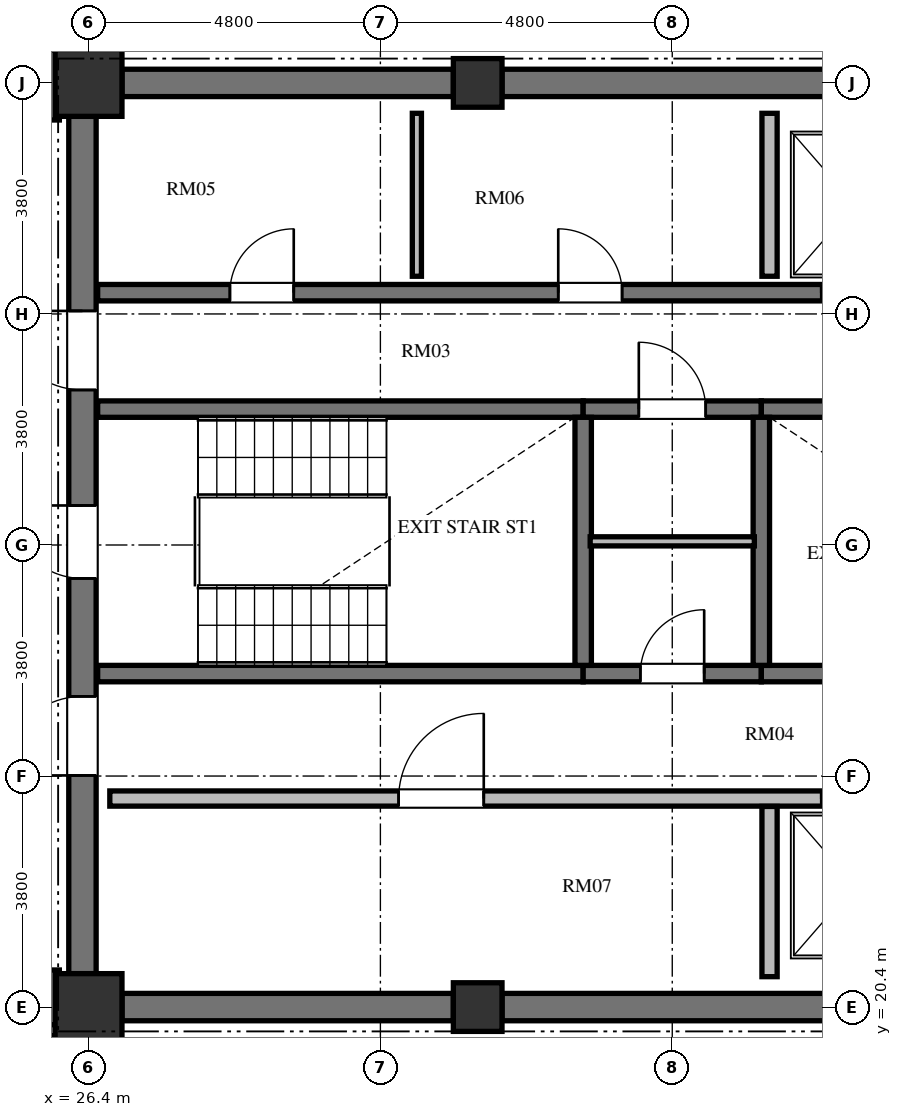
"""IFC4 building model, lengths in metres.
Left out: names, types, materials, properties, quantities, classifications, styles, units other than length and angle.
Written with IfcOpenShell. Run it as: python <this file> out.ifc"""

import sys

from ifc_helpers import new_model, si_unit, direction, frame, frame_2d, origin, origin_2d, place, context, subcontext, project, spatial, rectangle, extrude, element, fill, save


model = new_model("IFC4")
c1 = context("Model", 3, precision=1e-05, world=origin(), true_north=direction((0.0, 1.0)))
c2 = subcontext(c1, "Body", "Model", "MODEL_VIEW")
j1 = project(units=[si_unit("LENGTHUNIT", "METRE"), si_unit("PLANEANGLEUNIT", "RADIAN")], contexts=[c1])
p1 = place(None, origin())
s1 = spatial("IfcSite", under=j1, at=p1, CompositionType="ELEMENT")
p2 = place(p1, origin())
s2 = spatial("IfcBuilding", under=s1, at=p2, CompositionType="ELEMENT")
p3 = place(p2, frame((0.0, 0.0, 255.024)))
s3 = spatial("IfcBuildingStorey", under=s2, at=p3, CompositionType="ELEMENT", Elevation=255.024)
p4 = place(p3, frame((26.4, 20.4, 0.0), z_axis=(0.0, 0.0, 1.0), x_axis=(1.0, 0.0, 0.0)))
e1 = element("IfcColumn", 1, at=p4, inside=s3, PredefinedType="COLUMN", context=c2, shape_type="SweptSolid", body=[
    extrude(rectangle(XDim=1.1, YDim=1.1, at=origin_2d()), origin(), (0.0, 0.0, 1.0), 3.648),
])
for number, where, z_axis, x_axis in (
    (2, (32.8, 20.4, 0.0), (0.0, 0.0, 1.0), (1.0, 0.0, 0.0)),
    (3, (32.8, 35.6, 0.0), (0.0, 0.0, 1.0), (1.0, 0.0, 0.0)),
):
    element("IfcColumn", number, at=place(p3, frame(where, z_axis=z_axis, x_axis=x_axis)), inside=s3, PredefinedType="COLUMN", context=c2, shape_type="SweptSolid", body=[
        extrude(rectangle(XDim=0.8, YDim=0.8, at=origin_2d()), origin(), (0.0, 0.0, 1.0), 3.648),
    ])
p5 = place(p3, frame((26.4, 35.6, 0.0), z_axis=(0.0, 0.0, 1.0), x_axis=(1.0, 0.0, 0.0)))
e4 = element("IfcColumn", 4, at=p5, inside=s3, PredefinedType="COLUMN", context=c2, shape_type="SweptSolid", body=[
    extrude(rectangle(XDim=1.1, YDim=1.1, at=origin_2d()), origin(), (0.0, 0.0, 1.0), 3.648),
])
p6 = place(p3, frame((26.3, 20.95, 0.0), z_axis=(0.0, 0.0, 1.0), x_axis=(0.0, 1.0, 0.0)))
e5 = element("IfcWall", 5, at=p6, inside=s3, PredefinedType="SHEAR", context=c2, shape_type="SweptSolid", body=[
    extrude(rectangle(XDim=14.1, YDim=0.45, at=frame_2d((7.05, 0.0))), origin(), (0.0, 0.0, 1.0), 3.648),
])
p7 = place(p6, frame((6.5, 0.0, 0.0)))
e6 = element("IfcOpeningElement", 6, at=p7, cuts=e5, PredefinedType="OPENING", context=c2, shape_type="SweptSolid", body=[
    extrude(rectangle(XDim=1.2, YDim=2.15, at=frame_2d((0.6, 1.075))), frame((0.0, 0.235, 0.0), z_axis=(0.0, -1.0, 0.0), x_axis=(1.0, 0.0, 0.0)), (0.0, 0.0, 1.0), 0.47),
])
p8 = place(p6, frame((9.6, 0.0, 0.0)))
e7 = element("IfcOpeningElement", 7, at=p8, cuts=e5, PredefinedType="OPENING", context=c2, shape_type="SweptSolid", body=[
    extrude(rectangle(XDim=1.3, YDim=2.2, at=frame_2d((0.65, 1.1))), frame((0.0, 0.235, 0.0), z_axis=(0.0, -1.0, 0.0), x_axis=(1.0, 0.0, 0.0)), (0.0, 0.0, 1.0), 0.47),
])
p9 = place(p6, frame((3.26, 0.0, 0.0)))
e8 = element("IfcOpeningElement", 8, at=p9, cuts=e5, PredefinedType="OPENING", context=c2, shape_type="SweptSolid", body=[
    extrude(rectangle(XDim=1.3, YDim=2.2, at=frame_2d((0.65, 1.1))), frame((0.0, 0.235, 0.0), z_axis=(0.0, -1.0, 0.0), x_axis=(1.0, 0.0, 0.0)), (0.0, 0.0, 1.0), 0.47),
])
for number, where, z_axis, x_axis in (
    (9, (26.95, 20.4, 0.0), (0.0, 0.0, 1.0), (1.0, 0.0, 0.0)),
    (10, (26.95, 35.6, 0.0), (0.0, 0.0, 1.0), (1.0, 0.0, 0.0)),
):
    element("IfcWall", number, at=place(p3, frame(where, z_axis=z_axis, x_axis=x_axis)), inside=s3, PredefinedType="SHEAR", context=c2, shape_type="SweptSolid", body=[
        extrude(rectangle(XDim=5.45, YDim=0.45, at=frame_2d((2.725, 0.0))), origin(), (0.0, 0.0, 1.0), 3.648),
    ])
for number, where, z_axis, x_axis in (
    (11, (33.2, 20.4, 0.0), (0.0, 0.0, 1.0), (1.0, 0.0, 0.0)),
    (12, (33.2, 35.6, 0.0), (0.0, 0.0, 1.0), (1.0, 0.0, 0.0)),
):
    element("IfcWall", number, at=place(p3, frame(where, z_axis=z_axis, x_axis=x_axis)), inside=s3, PredefinedType="SHEAR", context=c2, shape_type="SweptSolid", body=[
        extrude(rectangle(XDim=5.6, YDim=0.45, at=frame_2d((2.8, 0.0))), origin(), (0.0, 0.0, 1.0), 3.648),
    ])
p10 = place(p3, frame((26.55, 30.235, 0.0), z_axis=(0.0, 0.0, 1.0), x_axis=(1.0, 0.0, 0.0)))
e13 = element("IfcWall", 13, at=p10, inside=s3, PredefinedType="SHEAR", context=c2, shape_type="SweptSolid", body=[
    extrude(rectangle(XDim=7.985, YDim=0.27, at=frame_2d((3.992, 0.0))), origin(), (0.0, 0.0, 1.0), 3.648),
])
p11 = place(p3, frame((34.535, 30.235, 0.0), z_axis=(0.0, 0.0, 1.0), x_axis=(1.0, 0.0, 0.0)))
e14 = element("IfcWall", 14, at=p11, inside=s3, PredefinedType="SHEAR", context=c2, shape_type="SweptSolid", body=[
    extrude(rectangle(XDim=2.93, YDim=0.27, at=frame_2d((1.465, 0.0))), origin(), (0.0, 0.0, 1.0), 3.648),
])
p12 = place(p11, frame((0.915, 0.0, 0.0)))
e15 = element("IfcOpeningElement", 15, at=p12, cuts=e14, PredefinedType="OPENING", context=c2, shape_type="SweptSolid", body=[
    extrude(rectangle(XDim=1.1, YDim=2.15, at=frame_2d((0.55, 1.075))), frame((0.0, 0.145, 0.0), z_axis=(0.0, -1.0, 0.0), x_axis=(1.0, 0.0, 0.0)), (0.0, 0.0, 1.0), 0.29),
])
p13 = place(p3, frame((37.465, 30.235, 0.0), z_axis=(0.0, 0.0, 1.0), x_axis=(1.0, 0.0, 0.0)))
e16 = element("IfcWall", 16, at=p13, inside=s3, PredefinedType="SHEAR", context=c2, shape_type="SweptSolid", body=[
    extrude(rectangle(XDim=7.985, YDim=0.27, at=frame_2d((3.992, 0.0))), origin(), (0.0, 0.0, 1.0), 3.648),
])
p14 = place(p13, frame((6.455, 0.0, 0.0)))
e17 = element("IfcOpeningElement", 17, at=p14, cuts=e16, PredefinedType="OPENING", context=c2, shape_type="SweptSolid", body=[
    extrude(rectangle(XDim=1.2, YDim=2.15, at=frame_2d((0.6, 1.075))), frame((0.0, 0.145, 0.0), z_axis=(0.0, -1.0, 0.0), x_axis=(1.0, 0.0, 0.0)), (0.0, 0.0, 1.0), 0.29),
])
p15 = place(p3, frame((26.55, 25.885, 0.0), z_axis=(0.0, 0.0, 1.0), x_axis=(1.0, 0.0, 0.0)))
e18 = element("IfcWall", 18, at=p15, inside=s3, PredefinedType="SHEAR", context=c2, shape_type="SweptSolid", body=[
    extrude(rectangle(XDim=7.985, YDim=0.27, at=frame_2d((3.992, 0.0))), origin(), (0.0, 0.0, 1.0), 3.648),
])
p16 = place(p3, frame((34.535, 25.885, 0.0), z_axis=(0.0, 0.0, 1.0), x_axis=(1.0, 0.0, 0.0)))
e19 = element("IfcWall", 19, at=p16, inside=s3, PredefinedType="SHEAR", context=c2, shape_type="SweptSolid", body=[
    extrude(rectangle(XDim=2.93, YDim=0.27, at=frame_2d((1.465, 0.0))), origin(), (0.0, 0.0, 1.0), 3.648),
])
p17 = place(p16, frame((0.94, 0.0, 0.0)))
e20 = element("IfcOpeningElement", 20, at=p17, cuts=e19, PredefinedType="OPENING", context=c2, shape_type="SweptSolid", body=[
    extrude(rectangle(XDim=1.05, YDim=2.15, at=frame_2d((0.525, 1.075))), frame((0.0, 0.145, 0.0), z_axis=(0.0, -1.0, 0.0), x_axis=(1.0, 0.0, 0.0)), (0.0, 0.0, 1.0), 0.29),
])
p18 = place(p3, frame((37.465, 25.885, 0.0), z_axis=(0.0, 0.0, 1.0), x_axis=(1.0, 0.0, 0.0)))
e21 = element("IfcWall", 21, at=p18, inside=s3, PredefinedType="SHEAR", context=c2, shape_type="SweptSolid", body=[
    extrude(rectangle(XDim=7.985, YDim=0.27, at=frame_2d((3.992, 0.0))), origin(), (0.0, 0.0, 1.0), 3.648),
])
for number, where, z_axis, x_axis in (
    (22, (34.535, 26.02, 0.0), (0.0, 0.0, 1.0), (0.0, 1.0, 0.0)),
    (23, (37.465, 26.02, 0.0), (0.0, 0.0, 1.0), (0.0, 1.0, 0.0)),
):
    element("IfcWall", number, at=place(p3, frame(where, z_axis=z_axis, x_axis=x_axis)), inside=s3, PredefinedType="SHEAR", context=c2, shape_type="SweptSolid", body=[
        extrude(rectangle(XDim=4.08, YDim=0.27, at=frame_2d((2.04, 0.0))), origin(), (0.0, 0.0, 1.0), 3.648),
    ])
p19 = place(p3, frame((34.65, 28.06, 0.0), z_axis=(0.0, 0.0, 1.0), x_axis=(1.0, 0.0, 0.0)))
e24 = element("IfcWall", 24, at=p19, inside=s3, PredefinedType="PARTITIONING", context=c2, shape_type="SweptSolid", body=[
    extrude(rectangle(XDim=2.7, YDim=0.15, at=frame_2d((1.35, 0.0))), origin(), (0.0, 0.0, 1.0), 3.448),
])
p20 = place(p3, frame((26.55, 32.15, 0.0), z_axis=(0.0, 0.0, 1.0), x_axis=(1.0, 0.0, 0.0)))
e25 = element("IfcWall", 25, at=p20, inside=s3, PredefinedType="SHEAR", context=c2, shape_type="SweptSolid", body=[
    extrude(rectangle(XDim=16.4, YDim=0.27, at=frame_2d((8.2, 0.0))), origin(), (0.0, 0.0, 1.0), 3.648),
])
p21 = place(p20, frame((2.175, 0.0, 0.0)))
e26 = element("IfcOpeningElement", 26, at=p21, cuts=e25, PredefinedType="OPENING", context=c2, shape_type="SweptSolid", body=[
    extrude(rectangle(XDim=1.05, YDim=2.15, at=frame_2d((0.525, 1.075))), frame((0.0, 0.145, 0.0), z_axis=(0.0, -1.0, 0.0), x_axis=(1.0, 0.0, 0.0)), (0.0, 0.0, 1.0), 0.29),
])
p22 = place(p20, frame((7.575, 0.0, 0.0)))
e27 = element("IfcOpeningElement", 27, at=p22, cuts=e25, PredefinedType="OPENING", context=c2, shape_type="SweptSolid", body=[
    extrude(rectangle(XDim=1.05, YDim=2.15, at=frame_2d((0.525, 1.075))), frame((0.0, 0.145, 0.0), z_axis=(0.0, -1.0, 0.0), x_axis=(1.0, 0.0, 0.0)), (0.0, 0.0, 1.0), 0.29),
])
p23 = place(p20, frame((11.9, 0.0, 0.0)))
e28 = element("IfcOpeningElement", 28, at=p23, cuts=e25, PredefinedType="OPENING", context=c2, shape_type="SweptSolid", body=[
    extrude(rectangle(XDim=1.1, YDim=2.2, at=frame_2d((0.55, 1.1))), frame((0.0, 0.145, 0.0), z_axis=(0.0, -1.0, 0.0), x_axis=(1.0, 0.0, 0.0)), (0.0, 0.0, 1.0), 0.29),
])
p24 = place(p20, frame((14.5, 0.0, 0.0)))
e29 = element("IfcOpeningElement", 29, at=p24, cuts=e25, PredefinedType="OPENING", context=c2, shape_type="SweptSolid", body=[
    extrude(rectangle(XDim=1.1, YDim=2.2, at=frame_2d((0.55, 1.1))), frame((0.0, 0.145, 0.0), z_axis=(0.0, -1.0, 0.0), x_axis=(1.0, 0.0, 0.0)), (0.0, 0.0, 1.0), 0.29),
])
p25 = place(p3, frame((26.75, 23.83, 0.0), z_axis=(0.0, 0.0, 1.0), x_axis=(1.0, 0.0, 0.0)))
e30 = element("IfcWall", 30, at=p25, inside=s3, PredefinedType="SOLIDWALL", context=c2, shape_type="SweptSolid", body=[
    extrude(rectangle(XDim=16.2, YDim=0.25, at=frame_2d((8.1, 0.0))), origin(), (0.0, 0.0, 1.0), 3.448),
])
p26 = place(p25, frame((4.75, 0.0, 0.0)))
e31 = element("IfcOpeningElement", 31, at=p26, cuts=e30, PredefinedType="OPENING", context=c2, shape_type="SweptSolid", body=[
    extrude(rectangle(XDim=1.4, YDim=2.2, at=frame_2d((0.7, 1.1))), frame((0.0, 0.135, 0.0), z_axis=(0.0, -1.0, 0.0), x_axis=(1.0, 0.0, 0.0)), (0.0, 0.0, 1.0), 0.27),
])
p27 = place(p25, frame((11.7, 0.0, 0.0)))
e32 = element("IfcOpeningElement", 32, at=p27, cuts=e30, PredefinedType="OPENING", context=c2, shape_type="SweptSolid", body=[
    extrude(rectangle(XDim=1.1, YDim=2.2, at=frame_2d((0.55, 1.1))), frame((0.0, 0.135, 0.0), z_axis=(0.0, -1.0, 0.0), x_axis=(1.0, 0.0, 0.0)), (0.0, 0.0, 1.0), 0.27),
])
p28 = place(p25, frame((14.15, 0.0, 0.0)))
e33 = element("IfcOpeningElement", 33, at=p28, cuts=e30, PredefinedType="OPENING", context=c2, shape_type="SweptSolid", body=[
    extrude(rectangle(XDim=1.4, YDim=2.3, at=frame_2d((0.7, 1.15))), frame((0.0, 0.135, 0.0), z_axis=(0.0, -1.0, 0.0), x_axis=(1.0, 0.0, 0.0)), (0.0, 0.0, 1.0), 0.27),
])
p29 = place(p3, frame((37.6, 32.42, 0.0), z_axis=(0.0, 0.0, 1.0), x_axis=(0.0, 1.0, 0.0)))
e34 = element("IfcWall", 34, at=p29, inside=s3, PredefinedType="SOLIDWALL", context=c2, shape_type="SweptSolid", body=[
    extrude(rectangle(XDim=2.68, YDim=0.25, at=frame_2d((1.34, 0.0))), origin(), (0.0, 0.0, 1.0), 3.448),
])
p30 = place(p3, frame((37.6, 20.9, 0.0), z_axis=(0.0, 0.0, 1.0), x_axis=(0.0, 1.0, 0.0)))
e35 = element("IfcWall", 35, at=p30, inside=s3, PredefinedType="SOLIDWALL", context=c2, shape_type="SweptSolid", body=[
    extrude(rectangle(XDim=2.8, YDim=0.25, at=frame_2d((1.4, 0.0))), origin(), (0.0, 0.0, 1.0), 3.448),
])
p31 = place(p3, frame((31.8, 32.42, 0.0), z_axis=(0.0, 0.0, 1.0), x_axis=(0.0, 1.0, 0.0)))
e36 = element("IfcWall", 36, at=p31, inside=s3, PredefinedType="PARTITIONING", context=c2, shape_type="SweptSolid", body=[
    extrude(rectangle(XDim=2.68, YDim=0.15, at=frame_2d((1.34, 0.0))), origin(), (0.0, 0.0, 1.0), 3.448),
])
p32 = place(p3, frame((25.83, 36.14, 0.0), z_axis=(0.0, 0.0, 1.0), x_axis=(0.0, -1.0, 0.0)))
e37 = element("IfcWall", 37, at=p32, inside=s3, PredefinedType="PARTITIONING", context=c2, shape_type="SweptSolid", body=[
    extrude(rectangle(XDim=1.15, YDim=0.18, at=frame_2d((0.575, 0.0))), origin(), (0.0, 0.0, 1.0), 3.448),
])
p33 = place(p3, frame((25.83, 21.01, 0.0), z_axis=(0.0, 0.0, 1.0), x_axis=(0.0, -1.0, 0.0)))
e38 = element("IfcWall", 38, at=p33, inside=s3, PredefinedType="PARTITIONING", context=c2, shape_type="SweptSolid", body=[
    extrude(rectangle(XDim=1.03, YDim=0.18, at=frame_2d((0.515, 0.0))), origin(), (0.0, 0.0, 1.0), 3.448),
])
p34 = place(p3, frame((25.87, 20.02, 0.0), z_axis=(0.0, 0.0, 1.0), x_axis=(-1.0, 0.0, 0.0)))
e39 = element("IfcWall", 39, at=p34, inside=s3, PredefinedType="PARTITIONING", context=c2, shape_type="SweptSolid", body=[
    extrude(rectangle(XDim=2.56, YDim=0.18, at=frame_2d((1.28, 0.0))), origin(), (0.0, 0.0, 1.0), 3.448),
])
p35 = place(p7, origin())
e40 = element("IfcDoor", 40, at=p35, inside=s3, OperationType="SINGLE_SWING_RIGHT", PredefinedType="DOOR", context=c2, shape_type="SweptSolid", body=[
    extrude(rectangle(XDim=1.2, YDim=2.15, at=frame_2d((0.6, 1.075))), frame((0.0, 0.025, 0.0), z_axis=(0.0, -1.0, 0.0), x_axis=(1.0, 0.0, 0.0)), (0.0, 0.0, 1.0), 0.05),
])
fill(e6, e40)
p36 = place(p17, origin())
e41 = element("IfcDoor", 41, at=p36, inside=s3, OperationType="SINGLE_SWING_RIGHT", PredefinedType="DOOR", context=c2, shape_type="SweptSolid", body=[
    extrude(rectangle(XDim=1.05, YDim=2.15, at=frame_2d((0.525, 1.075))), frame((0.0, 0.025, 0.0), z_axis=(0.0, -1.0, 0.0), x_axis=(1.0, 0.0, 0.0)), (0.0, 0.0, 1.0), 0.05),
])
fill(e20, e41)
p37 = place(p12, origin())
e42 = element("IfcDoor", 42, at=p37, inside=s3, OperationType="SINGLE_SWING_LEFT", PredefinedType="DOOR", context=c2, shape_type="SweptSolid", body=[
    extrude(rectangle(XDim=1.1, YDim=2.15, at=frame_2d((0.55, 1.075))), frame((0.0, 0.025, 0.0), z_axis=(0.0, -1.0, 0.0), x_axis=(1.0, 0.0, 0.0)), (0.0, 0.0, 1.0), 0.05),
])
fill(e15, e42)
p38 = place(p8, origin())
e43 = element("IfcDoor", 43, at=p38, inside=s3, OperationType="SINGLE_SWING_RIGHT", PredefinedType="DOOR", context=c2, shape_type="SweptSolid", body=[
    extrude(rectangle(XDim=1.3, YDim=2.2, at=frame_2d((0.65, 1.1))), frame((0.0, 0.025, 0.0), z_axis=(0.0, -1.0, 0.0), x_axis=(1.0, 0.0, 0.0)), (0.0, 0.0, 1.0), 0.05),
])
fill(e7, e43)
p39 = place(p9, origin())
e44 = element("IfcDoor", 44, at=p39, inside=s3, OperationType="SINGLE_SWING_LEFT", PredefinedType="DOOR", context=c2, shape_type="SweptSolid", body=[
    extrude(rectangle(XDim=1.3, YDim=2.2, at=frame_2d((0.65, 1.1))), frame((0.0, 0.025, 0.0), z_axis=(0.0, -1.0, 0.0), x_axis=(1.0, 0.0, 0.0)), (0.0, 0.0, 1.0), 0.05),
])
fill(e8, e44)
p40 = place(p21, origin())
e45 = element("IfcDoor", 45, at=p40, inside=s3, OperationType="SINGLE_SWING_RIGHT", PredefinedType="DOOR", context=c2, shape_type="SweptSolid", body=[
    extrude(rectangle(XDim=1.05, YDim=2.15, at=frame_2d((0.525, 1.075))), frame((0.0, 0.025, 0.0), z_axis=(0.0, -1.0, 0.0), x_axis=(1.0, 0.0, 0.0)), (0.0, 0.0, 1.0), 0.05),
])
fill(e26, e45)
p41 = place(p22, origin())
e46 = element("IfcDoor", 46, at=p41, inside=s3, OperationType="SINGLE_SWING_LEFT", PredefinedType="DOOR", context=c2, shape_type="SweptSolid", body=[
    extrude(rectangle(XDim=1.05, YDim=2.15, at=frame_2d((0.525, 1.075))), frame((0.0, 0.025, 0.0), z_axis=(0.0, -1.0, 0.0), x_axis=(1.0, 0.0, 0.0)), (0.0, 0.0, 1.0), 0.05),
])
fill(e27, e46)
p42 = place(p26, origin())
e47 = element("IfcDoor", 47, at=p42, inside=s3, OperationType="SINGLE_SWING_RIGHT", PredefinedType="DOOR", context=c2, shape_type="SweptSolid", body=[
    extrude(rectangle(XDim=1.4, YDim=2.2, at=frame_2d((0.7, 1.1))), frame((0.0, 0.025, 0.0), z_axis=(0.0, -1.0, 0.0), x_axis=(1.0, 0.0, 0.0)), (0.0, 0.0, 1.0), 0.05),
])
fill(e31, e47)
p43 = place(p23, origin())
e48 = element("IfcDoor", 48, at=p43, inside=s3, OperationType="SLIDING_TO_LEFT", PredefinedType="DOOR", context=c2, shape_type="SweptSolid", body=[
    extrude(rectangle(XDim=1.1, YDim=2.2, at=frame_2d((0.55, 1.1))), frame((0.0, 0.025, 0.0), z_axis=(0.0, -1.0, 0.0), x_axis=(1.0, 0.0, 0.0)), (0.0, 0.0, 1.0), 0.05),
])
fill(e28, e48)
p44 = place(p27, origin())
e49 = element("IfcDoor", 49, at=p44, inside=s3, OperationType="SLIDING_TO_LEFT", PredefinedType="DOOR", context=c2, shape_type="SweptSolid", body=[
    extrude(rectangle(XDim=1.1, YDim=2.2, at=frame_2d((0.55, 1.1))), frame((0.0, 0.025, 0.0), z_axis=(0.0, -1.0, 0.0), x_axis=(1.0, 0.0, 0.0)), (0.0, 0.0, 1.0), 0.05),
])
fill(e32, e49)
save(model, sys.argv[1])
